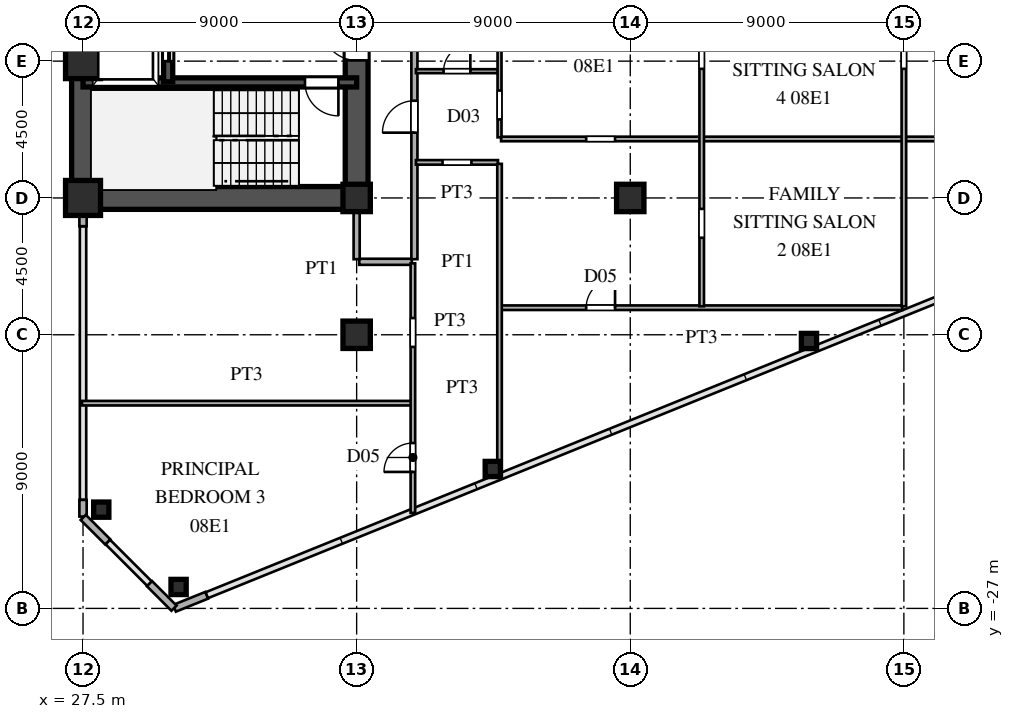
"""IFC4 building model, lengths in metres.
Left out: names, types, materials, properties, quantities, classifications, styles, units other than length and angle.
Written with IfcOpenShell. Run it as: python <this file> out.ifc"""

import sys

from ifc_helpers import new_model, si_unit, direction, frame, frame_2d, origin, origin_2d, place, context, subcontext, project, spatial, rectangle, hollow_rectangle, i_section, extrude, source, transform, mapped, element, fill, save


model = new_model("IFC4")
c1 = context("Model", 3, precision=1e-05, world=origin(), true_north=direction((0.0, 1.0)))
c2 = subcontext(c1, "Body", "Model", "MODEL_VIEW")
j1 = project(units=[si_unit("LENGTHUNIT", "METRE"), si_unit("PLANEANGLEUNIT", "RADIAN")], contexts=[c1])
p1 = place(None, origin())
s1 = spatial("IfcSite", under=j1, at=p1, CompositionType="ELEMENT")
p2 = place(p1, origin())
s2 = spatial("IfcBuilding", under=s1, at=p2, CompositionType="ELEMENT")
p3 = place(p2, frame((0.0, 0.0, 33.3)))
s3 = spatial("IfcBuildingStorey", under=s2, at=p3, CompositionType="ELEMENT", Elevation=33.3)
m1 = source(origin(), c2, "Body", "SweptSolid", [
    extrude(hollow_rectangle(XDim=1.15, YDim=1.15, WallThickness=0.048, at=origin_2d()), origin(), (0.0, 0.0, 1.0), 3.6),
])
for number, where, z_axis, x_axis in (
    (1, (27.5, -13.5, 0.0), (0.0, 0.0, 1.0), (1.0, 0.0, 0.0)),
    (2, (27.5, -9.0, 0.0), (0.0, 0.0, 1.0), (1.0, 0.0, 0.0)),
):
    element("IfcColumn", number, at=place(p3, frame(where, z_axis=z_axis, x_axis=x_axis)), inside=s3, PredefinedType="COLUMN", context=c2, shape_type="MappedRepresentation", body=[
        mapped(m1, transform((0.0, 0.0, 0.0), scale=1.0)),
    ])
m2 = source(origin(), c2, "Body", "SweptSolid", [
    extrude(i_section(OverallWidth=0.9, OverallDepth=0.9, WebThickness=0.036, FlangeThickness=0.055, at=origin_2d()), origin(), (0.0, 0.0, 1.0), 3.6),
])
for number, where, z_axis, x_axis in (
    (3, (36.5, -18.0, 0.0), (0.0, 0.0, 1.0), (1.0, 0.0, 0.0)),
    (4, (36.5, -13.5, 0.0), (0.0, 0.0, 1.0), (1.0, 0.0, 0.0)),
    (5, (45.5, -13.5, 0.0), (0.0, 0.0, 1.0), (1.0, 0.0, 0.0)),
):
    element("IfcColumn", number, at=place(p3, frame(where, z_axis=z_axis, x_axis=x_axis)), inside=s3, PredefinedType="COLUMN", context=c2, shape_type="MappedRepresentation", body=[
        mapped(m2, transform((0.0, 0.0, 0.0), scale=1.0)),
    ])
m3 = source(origin(), c2, "Body", "SweptSolid", [
    extrude(hollow_rectangle(XDim=0.5, YDim=0.5, WallThickness=0.02, at=origin_2d()), origin(), (0.0, 0.0, 1.0), 3.6),
])
for number, where, z_axis, x_axis in (
    (6, (30.643, -26.295, 0.0), (0.0, 0.0, 1.0), (1.0, 0.0, 0.0)),
    (7, (28.1, -23.751, 0.0), (0.0, 0.0, 1.0), (1.0, 0.0, 0.0)),
    (8, (40.977, -22.414, 0.0), (0.0, 0.0, 1.0), (1.0, 0.0, 0.0)),
    (9, (51.378, -18.204, 0.0), (0.0, 0.0, 1.0), (1.0, 0.0, 0.0)),
):
    element("IfcColumn", number, at=place(p3, frame(where, z_axis=z_axis, x_axis=x_axis)), inside=s3, PredefinedType="COLUMN", context=c2, shape_type="MappedRepresentation", body=[
        mapped(m3, transform((0.0, 0.0, 0.0), scale=1.0)),
    ])
p4 = place(p3, frame((30.509, -26.996, 0.0), z_axis=(0.0, 0.0, 1.0), x_axis=(0.927007103665, 0.375043770452, 0.0)))
e10 = element("IfcWall", 10, at=p4, inside=s3, PredefinedType="SOLIDWALL", context=c2, shape_type="SweptSolid", body=[
    extrude(rectangle(XDim=1.14, YDim=0.24, at=frame_2d((0.57, 0.0))), origin(), (0.0, 0.0, 1.0), 3.38),
])
p5 = place(p3, frame((27.5, -23.98, 0.0), z_axis=(0.0, 0.0, 1.0), x_axis=(0.0, 1.0, 0.0)))
e11 = element("IfcWall", 11, at=p5, inside=s3, PredefinedType="SOLIDWALL", context=c2, shape_type="SweptSolid", body=[
    extrude(rectangle(XDim=0.55, YDim=0.24, at=frame_2d((0.275, 0.0))), origin(), (0.0, 0.0, 1.0), 3.38),
])
p6 = place(p3, frame((27.5, -14.43, 0.0), z_axis=(0.0, 0.0, 1.0), x_axis=(0.0, 1.0, 0.0)))
e12 = element("IfcWall", 12, at=p6, inside=s3, PredefinedType="SOLIDWALL", context=c2, shape_type="SweptSolid", body=[
    extrude(rectangle(XDim=0.55, YDim=0.24, at=frame_2d((0.275, 0.0))), origin(), (0.0, 0.0, 1.0), 2.88),
])
for number, where, z_axis, x_axis in (
    (13, (27.507, -24.007, 0.0), (0.0, 0.0, 1.0), (0.707, -0.707, 0.0)),
    (14, (29.687, -26.187, 0.0), (0.0, 0.0, 1.0), (0.707, -0.707, 0.0)),
):
    element("IfcWall", number, at=place(p3, frame(where, z_axis=z_axis, x_axis=x_axis)), inside=s3, PredefinedType="SOLIDWALL", context=c2, shape_type="SweptSolid", body=[
        extrude(rectangle(XDim=1.14, YDim=0.24, at=frame_2d((0.57, 0.0))), origin(), (0.0, 0.0, 1.0), 3.38),
    ])
p7 = place(p3, frame((27.5, -13.5, 0.0), z_axis=(0.0, 0.0, 1.0), x_axis=(0.0, 1.0, 0.0)))
e15 = element("IfcWall", 15, at=p7, inside=s3, PredefinedType="SHEAR", context=c2, shape_type="SweptSolid", body=[
    extrude(rectangle(XDim=12.2, YDim=0.75, at=frame_2d((6.1, 0.0))), origin(), (0.0, 0.0, 1.0), 3.38),
])
p8 = place(p3, frame((27.5, -13.5, 0.0), z_axis=(0.0, 0.0, 1.0), x_axis=(1.0, 0.0, 0.0)))
e16 = element("IfcWall", 16, at=p8, inside=s3, PredefinedType="SHEAR", context=c2, shape_type="SweptSolid", body=[
    extrude(rectangle(XDim=9.0, YDim=0.75, at=frame_2d((4.5, 0.0))), origin(), (0.0, 0.0, 1.0), 3.38),
])
p9 = place(p3, frame((36.5, -13.65, 0.0), z_axis=(0.0, 0.0, 1.0), x_axis=(0.0, 1.0, 0.0)))
e17 = element("IfcWall", 17, at=p9, inside=s3, PredefinedType="SHEAR", context=c2, shape_type="SweptSolid", body=[
    extrude(rectangle(XDim=7.15, YDim=0.75, at=frame_2d((3.575, 0.0))), origin(), (0.0, 0.0, 1.0), 3.38),
])
p10 = place(p9, frame((4.675, 0.0, 0.0)))
e18 = element("IfcOpeningElement", 18, at=p10, cuts=e17, PredefinedType="OPENING", context=c2, shape_type="SweptSolid", body=[
    extrude(rectangle(XDim=1.15, YDim=2.2, at=frame_2d((0.575, 1.1))), frame((0.0, 0.385, 0.0), z_axis=(0.0, -1.0, 0.0), x_axis=(1.0, 0.0, 0.0)), (0.0, 0.0, 1.0), 0.77),
])
p11 = place(p3, frame((27.5, -9.7, 0.0), z_axis=(0.0, 0.0, 1.0), x_axis=(1.0, 0.0, 0.0)))
e19 = element("IfcWall", 19, at=p11, inside=s3, PredefinedType="SHEAR", context=c2, shape_type="SweptSolid", body=[
    extrude(rectangle(XDim=9.0, YDim=0.3, at=frame_2d((4.5, 0.0))), origin(), (0.0, 0.0, 1.0), 3.38),
])
p12 = place(p11, frame((7.3, 0.0, 0.0)))
e20 = element("IfcOpeningElement", 20, at=p12, cuts=e19, PredefinedType="OPENING", context=c2, shape_type="SweptSolid", body=[
    extrude(rectangle(XDim=1.1, YDim=2.2, at=frame_2d((0.55, 1.1))), frame((0.0, 0.16, 0.0), z_axis=(0.0, -1.0, 0.0), x_axis=(1.0, 0.0, 0.0)), (0.0, 0.0, 1.0), 0.32),
])
p13 = place(p3, frame((30.3, -9.68, 0.0), z_axis=(0.0, 0.0, 1.0), x_axis=(0.0, 1.0, 0.0)))
e21 = element("IfcWall", 21, at=p13, inside=s3, PredefinedType="SHEAR", context=c2, shape_type="SweptSolid", body=[
    extrude(rectangle(XDim=2.56, YDim=0.3, at=frame_2d((1.28, 0.0))), origin(), (0.0, 0.0, 1.0), 3.38),
])
p14 = place(p13, frame((0.68, 0.0, 0.0)))
e22 = element("IfcOpeningElement", 22, at=p14, cuts=e21, PredefinedType="OPENING", context=c2, shape_type="SweptSolid", body=[
    extrude(rectangle(XDim=1.2, YDim=2.25, at=frame_2d((0.6, 1.125))), frame((0.0, 0.16, 0.0), z_axis=(0.0, -1.0, 0.0), x_axis=(1.0, 0.0, 0.0)), (0.0, 0.0, 1.0), 0.32),
])
p15 = place(p3, frame((27.465, -20.25, 0.0), z_axis=(0.0, 0.0, 1.0), x_axis=(1.0, 0.0, 0.0)))
e23 = element("IfcWall", 23, at=p15, inside=s3, PredefinedType="PARTITIONING", context=c2, shape_type="SweptSolid", body=[
    extrude(rectangle(XDim=10.835, YDim=0.15, at=frame_2d((5.417, 0.0))), origin(), (0.0, 0.0, 1.0), 3.38),
])
p16 = place(p3, frame((41.25, -17.11, 0.0), z_axis=(0.0, 0.0, 1.0), x_axis=(1.0, 0.0, 0.0)))
e24 = element("IfcWall", 24, at=p16, inside=s3, PredefinedType="PARTITIONING", context=c2, shape_type="SweptSolid", body=[
    extrude(rectangle(XDim=13.2, YDim=0.15, at=frame_2d((6.6, 0.0))), origin(), (0.0, 0.0, 1.0), 3.38),
])
p17 = place(p16, frame((2.8, 0.0, 0.0)))
e25 = element("IfcOpeningElement", 25, at=p17, cuts=e24, PredefinedType="OPENING", context=c2, shape_type="SweptSolid", body=[
    extrude(rectangle(XDim=0.95, YDim=2.15, at=frame_2d((0.475, 1.075))), frame((0.0, 0.085, 0.0), z_axis=(0.0, -1.0, 0.0), x_axis=(1.0, 0.0, 0.0)), (0.0, 0.0, 1.0), 0.17),
])
p18 = place(p3, frame((36.585, -15.6, 0.0), z_axis=(0.0, 0.0, 1.0), x_axis=(1.0, 0.0, 0.0)))
e26 = element("IfcWall", 26, at=p18, inside=s3, PredefinedType="PARTITIONING", context=c2, shape_type="SweptSolid", body=[
    extrude(rectangle(XDim=1.73, YDim=0.2, at=frame_2d((0.865, 0.0))), origin(), (0.0, 0.0, 1.0), 3.38),
])
p19 = place(p3, frame((38.45, -12.33, 0.0), z_axis=(0.0, 0.0, 1.0), x_axis=(1.0, 0.0, 0.0)))
e27 = element("IfcWall", 27, at=p19, inside=s3, PredefinedType="PARTITIONING", context=c2, shape_type="SweptSolid", body=[
    extrude(rectangle(XDim=2.7, YDim=0.15, at=frame_2d((1.35, 0.0))), origin(), (0.0, 0.0, 1.0), 3.38),
])
p20 = place(p19, frame((0.875, 0.0, 0.0)))
e28 = element("IfcOpeningElement", 28, at=p20, cuts=e27, PredefinedType="OPENING", context=c2, shape_type="SweptSolid", body=[
    extrude(rectangle(XDim=0.95, YDim=2.15, at=frame_2d((0.475, 1.075))), frame((0.0, 0.085, 0.0), z_axis=(0.0, -1.0, 0.0), x_axis=(1.0, 0.0, 0.0)), (0.0, 0.0, 1.0), 0.17),
])
p21 = place(p3, frame((41.25, -11.56, 0.0), z_axis=(0.0, 0.0, 1.0), x_axis=(1.0, 0.0, 0.0)))
e29 = element("IfcWall", 29, at=p21, inside=s3, PredefinedType="PARTITIONING", context=c2, shape_type="SweptSolid", body=[
    extrude(rectangle(XDim=27.44, YDim=0.15, at=frame_2d((13.72, 0.0))), origin(), (0.0, 0.0, 1.0), 3.38),
])
p22 = place(p21, frame((2.8, 0.0, 0.0)))
e30 = element("IfcOpeningElement", 30, at=p22, cuts=e29, PredefinedType="OPENING", context=c2, shape_type="SweptSolid", body=[
    extrude(rectangle(XDim=0.95, YDim=2.15, at=frame_2d((0.475, 1.075))), frame((0.0, 0.085, 0.0), z_axis=(0.0, -1.0, 0.0), x_axis=(1.0, 0.0, 0.0)), (0.0, 0.0, 1.0), 0.17),
])
p23 = place(p21, frame((15.625, 0.0, 0.0)))
e31 = element("IfcOpeningElement", 31, at=p23, cuts=e29, PredefinedType="OPENING", context=c2, shape_type="SweptSolid", body=[
    extrude(rectangle(XDim=0.95, YDim=2.15, at=frame_2d((0.475, 1.075))), frame((0.0, 0.085, 0.0), z_axis=(0.0, -1.0, 0.0), x_axis=(1.0, 0.0, 0.0)), (0.0, 0.0, 1.0), 0.17),
])
p24 = place(p3, frame((38.45, -9.33, 0.0), z_axis=(0.0, 0.0, 1.0), x_axis=(1.0, 0.0, 0.0)))
e32 = element("IfcWall", 32, at=p24, inside=s3, PredefinedType="PARTITIONING", context=c2, shape_type="SweptSolid", body=[
    extrude(rectangle(XDim=2.7, YDim=0.13, at=frame_2d((1.35, 0.0))), origin(), (0.0, 0.0, 1.0), 3.38),
])
p25 = place(p24, frame((0.91, 0.0, 0.0)))
e33 = element("IfcOpeningElement", 33, at=p25, cuts=e32, PredefinedType="OPENING", context=c2, shape_type="SweptSolid", body=[
    extrude(rectangle(XDim=0.88, YDim=2.1, at=frame_2d((0.44, 1.05))), frame((0.0, 0.075, 0.0), z_axis=(0.0, -1.0, 0.0), x_axis=(1.0, 0.0, 0.0)), (0.0, 0.0, 1.0), 0.15),
])
p26 = place(p3, frame((36.5, -15.515, 0.0), z_axis=(0.0, 0.0, 1.0), x_axis=(0.0, 1.0, 0.0)))
e34 = element("IfcWall", 34, at=p26, inside=s3, PredefinedType="PARTITIONING", context=c2, shape_type="SweptSolid", body=[
    extrude(rectangle(XDim=1.635, YDim=0.2, at=frame_2d((0.817, 0.0))), origin(), (0.0, 0.0, 1.0), 2.68),
])
p27 = place(p3, frame((38.35, -23.858, 0.0), z_axis=(0.0, 0.0, 1.0), x_axis=(0.0, 1.0, 0.0)))
e35 = element("IfcWall", 35, at=p27, inside=s3, PredefinedType="PARTITIONING", context=c2, shape_type="SweptSolid", body=[
    extrude(rectangle(XDim=8.208, YDim=0.15, at=frame_2d((4.104, 0.0))), origin(), (0.0, 0.0, 1.0), 3.38),
])
p28 = place(p27, frame((1.347, 0.0, 0.0)))
e36 = element("IfcOpeningElement", 36, at=p28, cuts=e35, PredefinedType="OPENING", context=c2, shape_type="SweptSolid", body=[
    extrude(rectangle(XDim=0.95, YDim=2.15, at=frame_2d((0.475, 1.075))), frame((0.0, 0.085, 0.0), z_axis=(0.0, -1.0, 0.0), x_axis=(1.0, 0.0, 0.0)), (0.0, 0.0, 1.0), 0.17),
])
p29 = place(p27, frame((5.458, 0.0, 0.0)))
e37 = element("IfcOpeningElement", 37, at=p29, cuts=e35, PredefinedType="OPENING", context=c2, shape_type="SweptSolid", body=[
    extrude(rectangle(XDim=0.95, YDim=2.15, at=frame_2d((0.475, 1.075))), frame((0.0, 0.085, 0.0), z_axis=(0.0, -1.0, 0.0), x_axis=(1.0, 0.0, 0.0)), (0.0, 0.0, 1.0), 0.17),
])
p30 = place(p3, frame((38.4, -15.515, 0.0), z_axis=(0.0, 0.0, 1.0), x_axis=(0.0, 1.0, 0.0)))
e38 = element("IfcWall", 38, at=p30, inside=s3, PredefinedType="PARTITIONING", context=c2, shape_type="SweptSolid", body=[
    extrude(rectangle(XDim=31.03, YDim=0.2, at=frame_2d((15.515, 0.0))), origin(), (0.0, 0.0, 1.0), 3.38),
])
p31 = place(p30, frame((4.163, 0.0, 0.0)))
e39 = element("IfcOpeningElement", 39, at=p31, cuts=e38, PredefinedType="OPENING", context=c2, shape_type="SweptSolid", body=[
    extrude(rectangle(XDim=1.05, YDim=2.25, at=frame_2d((0.525, 1.125))), frame((0.0, 0.11, 0.0), z_axis=(0.0, -1.0, 0.0), x_axis=(1.0, 0.0, 0.0)), (0.0, 0.0, 1.0), 0.22),
])
p32 = place(p30, frame((15.538, 0.0, 0.0)))
e40 = element("IfcOpeningElement", 40, at=p32, cuts=e38, PredefinedType="OPENING", context=c2, shape_type="SweptSolid", body=[
    extrude(rectangle(XDim=1.05, YDim=2.25, at=frame_2d((0.525, 1.125))), frame((0.0, 0.11, 0.0), z_axis=(0.0, -1.0, 0.0), x_axis=(1.0, 0.0, 0.0)), (0.0, 0.0, 1.0), 0.22),
])
p33 = place(p30, frame((26.635, 0.0, 0.0)))
e41 = element("IfcOpeningElement", 41, at=p33, cuts=e38, PredefinedType="OPENING", context=c2, shape_type="SweptSolid", body=[
    extrude(rectangle(XDim=1.05, YDim=2.25, at=frame_2d((0.525, 1.125))), frame((0.0, 0.11, 0.0), z_axis=(0.0, -1.0, 0.0), x_axis=(1.0, 0.0, 0.0)), (0.0, 0.0, 1.0), 0.22),
])
p34 = place(p3, frame((41.2, -22.704, 0.0), z_axis=(0.0, 0.0, 1.0), x_axis=(0.0, 1.0, 0.0)))
e42 = element("IfcWall", 42, at=p34, inside=s3, PredefinedType="PARTITIONING", context=c2, shape_type="SweptSolid", body=[
    extrude(rectangle(XDim=10.326, YDim=0.15, at=frame_2d((5.163, 0.0))), origin(), (0.0, 0.0, 1.0), 3.38),
])
p35 = place(p3, frame((41.2, -11.506, 0.0), z_axis=(0.0, 0.0, 1.0), x_axis=(0.0, 1.0, 0.0)))
e43 = element("IfcWall", 43, at=p35, inside=s3, PredefinedType="PARTITIONING", context=c2, shape_type="SweptSolid", body=[
    extrude(rectangle(XDim=14.456, YDim=0.13, at=frame_2d((7.228, 0.0))), origin(), (0.0, 0.0, 1.0), 3.38),
])
p36 = place(p35, frame((0.589, 0.0, 0.0)))
e44 = element("IfcOpeningElement", 44, at=p36, cuts=e43, PredefinedType="OPENING", context=c2, shape_type="SweptSolid", body=[
    extrude(rectangle(XDim=0.95, YDim=2.15, at=frame_2d((0.475, 1.075))), frame((0.0, 0.075, 0.0), z_axis=(0.0, -1.0, 0.0), x_axis=(1.0, 0.0, 0.0)), (0.0, 0.0, 1.0), 0.15),
])
p37 = place(p35, frame((11.781, 0.0, 0.0)))
e45 = element("IfcOpeningElement", 45, at=p37, cuts=e43, PredefinedType="OPENING", context=c2, shape_type="SweptSolid", body=[
    extrude(rectangle(XDim=0.95, YDim=2.15, at=frame_2d((0.475, 1.075))), frame((0.0, 0.075, 0.0), z_axis=(0.0, -1.0, 0.0), x_axis=(1.0, 0.0, 0.0)), (0.0, 0.0, 1.0), 0.15),
])
p38 = place(p3, frame((47.85, -17.063, 0.0), z_axis=(0.0, 0.0, 1.0), x_axis=(0.0, 1.0, 0.0)))
e46 = element("IfcWall", 46, at=p38, inside=s3, PredefinedType="PARTITIONING", context=c2, shape_type="SweptSolid", body=[
    extrude(rectangle(XDim=34.626, YDim=0.15, at=frame_2d((17.313, 0.0))), origin(), (0.0, 0.0, 1.0), 3.38),
])
p39 = place(p38, frame((7.81, 0.0, 0.0)))
e47 = element("IfcOpeningElement", 47, at=p39, cuts=e46, PredefinedType="OPENING", context=c2, shape_type="SweptSolid", body=[
    extrude(rectangle(XDim=0.95, YDim=2.15, at=frame_2d((0.475, 1.075))), frame((0.0, 0.085, 0.0), z_axis=(0.0, -1.0, 0.0), x_axis=(1.0, 0.0, 0.0)), (0.0, 0.0, 1.0), 0.17),
])
p40 = place(p38, frame((2.253, 0.0, 0.0)))
e48 = element("IfcOpeningElement", 48, at=p40, cuts=e46, PredefinedType="OPENING", context=c2, shape_type="SweptSolid", body=[
    extrude(rectangle(XDim=0.95, YDim=2.15, at=frame_2d((0.475, 1.075))), frame((0.0, 0.085, 0.0), z_axis=(0.0, -1.0, 0.0), x_axis=(1.0, 0.0, 0.0)), (0.0, 0.0, 1.0), 0.17),
])
p41 = place(p38, frame((17.338, 0.0, 0.0)))
e49 = element("IfcOpeningElement", 49, at=p41, cuts=e46, PredefinedType="OPENING", context=c2, shape_type="SweptSolid", body=[
    extrude(rectangle(XDim=0.95, YDim=2.15, at=frame_2d((0.475, 1.075))), frame((0.0, 0.085, 0.0), z_axis=(0.0, -1.0, 0.0), x_axis=(1.0, 0.0, 0.0)), (0.0, 0.0, 1.0), 0.17),
])
p42 = place(p38, frame((26.616, 0.0, 0.0)))
e50 = element("IfcOpeningElement", 50, at=p42, cuts=e46, PredefinedType="OPENING", context=c2, shape_type="SweptSolid", body=[
    extrude(rectangle(XDim=0.95, YDim=2.15, at=frame_2d((0.475, 1.075))), frame((0.0, 0.085, 0.0), z_axis=(0.0, -1.0, 0.0), x_axis=(1.0, 0.0, 0.0)), (0.0, 0.0, 1.0), 0.17),
])
p43 = place(p3, frame((54.5, -17.063, 0.0), z_axis=(0.0, 0.0, 1.0), x_axis=(0.0, 1.0, 0.0)))
e51 = element("IfcWall", 51, at=p43, inside=s3, PredefinedType="PARTITIONING", context=c2, shape_type="SweptSolid", body=[
    extrude(rectangle(XDim=34.384, YDim=0.15, at=frame_2d((17.192, 0.0))), origin(), (0.0, 0.0, 1.0), 2.68),
])
p44 = place(p43, frame((7.81, 0.0, 0.0)))
e52 = element("IfcOpeningElement", 52, at=p44, cuts=e51, PredefinedType="OPENING", context=c2, shape_type="SweptSolid", body=[
    extrude(rectangle(XDim=0.95, YDim=2.15, at=frame_2d((0.475, 1.075))), frame((0.0, 0.085, 0.0), z_axis=(0.0, -1.0, 0.0), x_axis=(1.0, 0.0, 0.0)), (0.0, 0.0, 1.0), 0.17),
])
p45 = place(p43, frame((17.338, 0.0, 0.0)))
e53 = element("IfcOpeningElement", 53, at=p45, cuts=e51, PredefinedType="OPENING", context=c2, shape_type="SweptSolid", body=[
    extrude(rectangle(XDim=0.95, YDim=2.15, at=frame_2d((0.475, 1.075))), frame((0.0, 0.085, 0.0), z_axis=(0.0, -1.0, 0.0), x_axis=(1.0, 0.0, 0.0)), (0.0, 0.0, 1.0), 0.17),
])
p46 = place(p43, frame((13.131, 0.0, 0.0)))
e54 = element("IfcOpeningElement", 54, at=p46, cuts=e51, PredefinedType="OPENING", context=c2, shape_type="SweptSolid", body=[
    extrude(rectangle(XDim=0.95, YDim=2.15, at=frame_2d((0.475, 1.075))), frame((0.0, 0.085, 0.0), z_axis=(0.0, -1.0, 0.0), x_axis=(1.0, 0.0, 0.0)), (0.0, 0.0, 1.0), 0.17),
])
p47 = place(p43, frame((22.131, 0.0, 0.0)))
e55 = element("IfcOpeningElement", 55, at=p47, cuts=e51, PredefinedType="OPENING", context=c2, shape_type="SweptSolid", body=[
    extrude(rectangle(XDim=0.95, YDim=2.15, at=frame_2d((0.475, 1.075))), frame((0.0, 0.085, 0.0), z_axis=(0.0, -1.0, 0.0), x_axis=(1.0, 0.0, 0.0)), (0.0, 0.0, 1.0), 0.17),
])
p48 = place(p43, frame((26.616, 0.0, 0.0)))
e56 = element("IfcOpeningElement", 56, at=p48, cuts=e51, PredefinedType="OPENING", context=c2, shape_type="SweptSolid", body=[
    extrude(rectangle(XDim=0.95, YDim=2.15, at=frame_2d((0.475, 1.075))), frame((0.0, 0.085, 0.0), z_axis=(0.0, -1.0, 0.0), x_axis=(1.0, 0.0, 0.0)), (0.0, 0.0, 1.0), 0.17),
])
m4 = source(origin(), c2, "Body", "SweptSolid", [
    extrude(rectangle(XDim=1.15, YDim=2.2, at=frame_2d((0.575, 1.1))), frame((0.0, 0.025, 0.0), z_axis=(0.0, -1.0, 0.0), x_axis=(1.0, 0.0, 0.0)), (0.0, 0.0, 1.0), 0.05),
])
p49 = place(p10, origin())
e57 = element("IfcDoor", 57, at=p49, inside=s3, OperationType="SINGLE_SWING_RIGHT", PredefinedType="DOOR", context=c2, shape_type="MappedRepresentation", body=[
    mapped(m4, transform((0.0, 0.0, 0.0), scale=1.0)),
])
fill(e18, e57)
m5 = source(origin(), c2, "Body", "SweptSolid", [
    extrude(rectangle(XDim=1.1, YDim=2.2, at=frame_2d((0.55, 1.1))), frame((0.0, 0.025, 0.0), z_axis=(0.0, -1.0, 0.0), x_axis=(1.0, 0.0, 0.0)), (0.0, 0.0, 1.0), 0.05),
])
p50 = place(p12, frame((1.1, 0.0, 0.0), z_axis=(0.0, 0.0, 1.0), x_axis=(-1.0, 0.0, 0.0)))
e58 = element("IfcDoor", 58, at=p50, inside=s3, OperationType="SINGLE_SWING_RIGHT", PredefinedType="DOOR", context=c2, shape_type="MappedRepresentation", body=[
    mapped(m5, transform((0.0, 0.0, 0.0), scale=1.0)),
])
fill(e20, e58)
m6 = source(origin(), c2, "Body", "SweptSolid", [
    extrude(rectangle(XDim=1.2, YDim=2.25, at=frame_2d((0.6, 1.125))), frame((0.0, 0.025, 0.0), z_axis=(0.0, -1.0, 0.0), x_axis=(1.0, 0.0, 0.0)), (0.0, 0.0, 1.0), 0.05),
])
p51 = place(p14, origin())
e59 = element("IfcDoor", 59, at=p51, inside=s3, OperationType="DOUBLE_DOOR_SLIDING", PredefinedType="DOOR", context=c2, shape_type="MappedRepresentation", body=[
    mapped(m6, transform((0.0, 0.0, 0.0), scale=1.0)),
])
fill(e22, e59)
m7 = source(origin(), c2, "Body", "SweptSolid", [
    extrude(rectangle(XDim=0.95, YDim=2.15, at=frame_2d((0.475, 1.075))), frame((0.0, 0.025, 0.0), z_axis=(0.0, -1.0, 0.0), x_axis=(1.0, 0.0, 0.0)), (0.0, 0.0, 1.0), 0.05),
])
p52 = place(p17, origin())
e60 = element("IfcDoor", 60, at=p52, inside=s3, OperationType="SINGLE_SWING_RIGHT", PredefinedType="DOOR", context=c2, shape_type="MappedRepresentation", body=[
    mapped(m7, transform((0.0, 0.0, 0.0), scale=1.0)),
])
fill(e25, e60)
m8 = source(origin(), c2, "Body", "SweptSolid", [
    extrude(rectangle(XDim=0.88, YDim=2.1, at=frame_2d((0.44, 1.05))), frame((0.0, 0.025, 0.0), z_axis=(0.0, -1.0, 0.0), x_axis=(1.0, 0.0, 0.0)), (0.0, 0.0, 1.0), 0.05),
])
p53 = place(p25, origin())
e61 = element("IfcDoor", 61, at=p53, inside=s3, OperationType="SINGLE_SWING_RIGHT", PredefinedType="DOOR", context=c2, shape_type="MappedRepresentation", body=[
    mapped(m8, transform((0.0, 0.0, 0.0), scale=1.0)),
])
fill(e33, e61)
p54 = place(p28, origin())
e62 = element("IfcDoor", 62, at=p54, inside=s3, OperationType="SINGLE_SWING_LEFT", PredefinedType="DOOR", context=c2, shape_type="MappedRepresentation", body=[
    mapped(m7, transform((0.0, 0.0, 0.0), scale=1.0)),
])
fill(e36, e62)
m9 = source(origin(), c2, "Body", "SweptSolid", [
    extrude(rectangle(XDim=1.05, YDim=2.25, at=frame_2d((0.525, 1.125))), frame((0.0, 0.025, 0.0), z_axis=(0.0, -1.0, 0.0), x_axis=(1.0, 0.0, 0.0)), (0.0, 0.0, 1.0), 0.05),
])
p55 = place(p31, origin())
e63 = element("IfcDoor", 63, at=p55, inside=s3, OperationType="SINGLE_SWING_LEFT", PredefinedType="DOOR", context=c2, shape_type="MappedRepresentation", body=[
    mapped(m9, transform((0.0, 0.0, 0.0), scale=1.0)),
])
fill(e39, e63)
save(model, sys.argv[1])
